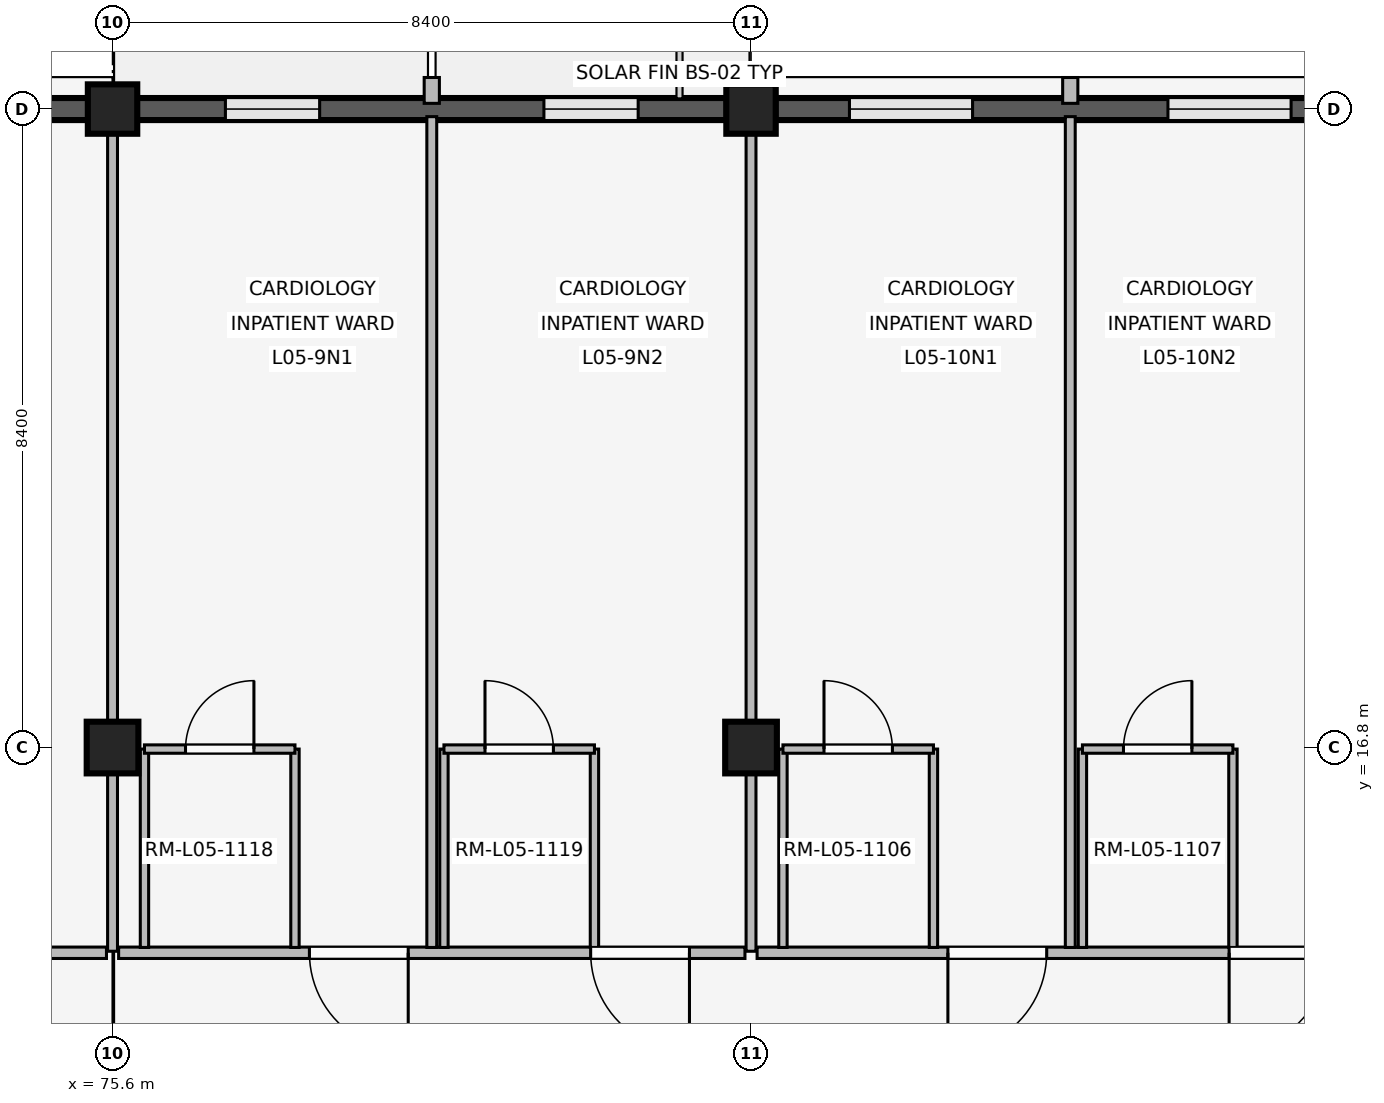
"""IFC4 building model, lengths in metres.
Left out: names, types, materials, properties, quantities, classifications, styles, units other than length and angle.
Written with IfcOpenShell. Run it as: python <this file> out.ifc"""

import sys

from ifc_helpers import new_model, si_unit, direction, frame, frame_2d, origin, origin_2d, place, context, subcontext, project, spatial, rectangle, extrude, element, fill, save


model = new_model("IFC4")
c1 = context("Model", 3, precision=1e-05, world=origin(), true_north=direction((0.0, 1.0)))
c2 = subcontext(c1, "Body", "Model", "MODEL_VIEW")
j1 = project(units=[si_unit("LENGTHUNIT", "METRE"), si_unit("PLANEANGLEUNIT", "RADIAN")], contexts=[c1])
p1 = place(None, origin())
s1 = spatial("IfcSite", under=j1, at=p1, CompositionType="ELEMENT")
p2 = place(p1, origin())
s2 = spatial("IfcBuilding", under=s1, at=p2, CompositionType="ELEMENT")
p3 = place(p2, frame((0.0, 0.0, 20.4)))
s3 = spatial("IfcBuildingStorey", under=s2, at=p3, CompositionType="ELEMENT", Elevation=20.4)
p4 = place(p3, frame((75.6, 16.8, 0.0), z_axis=(0.0, 0.0, 1.0), x_axis=(1.0, 0.0, 0.0)))
e1 = element("IfcColumn", 1, at=p4, inside=s3, PredefinedType="COLUMN", context=c2, shape_type="SweptSolid", body=[
    extrude(rectangle(XDim=0.68, YDim=0.68, at=origin_2d()), origin(), (0.0, 0.0, 1.0), 4.2),
])
p5 = place(p3, frame((75.6, 25.2, 0.0), z_axis=(0.0, 0.0, 1.0), x_axis=(1.0, 0.0, 0.0)))
e2 = element("IfcColumn", 2, at=p5, inside=s3, PredefinedType="COLUMN", context=c2, shape_type="SweptSolid", body=[
    extrude(rectangle(XDim=0.65, YDim=0.65, at=origin_2d()), origin(), (0.0, 0.0, 1.0), 4.2),
])
p6 = place(p3, frame((84.0, 16.8, 0.0), z_axis=(0.0, 0.0, 1.0), x_axis=(1.0, 0.0, 0.0)))
e3 = element("IfcColumn", 3, at=p6, inside=s3, PredefinedType="COLUMN", context=c2, shape_type="SweptSolid", body=[
    extrude(rectangle(XDim=0.68, YDim=0.68, at=origin_2d()), origin(), (0.0, 0.0, 1.0), 4.2),
])
p7 = place(p3, frame((84.0, 25.2, 0.0), z_axis=(0.0, 0.0, 1.0), x_axis=(1.0, 0.0, 0.0)))
e4 = element("IfcColumn", 4, at=p7, inside=s3, PredefinedType="COLUMN", context=c2, shape_type="SweptSolid", body=[
    extrude(rectangle(XDim=0.65, YDim=0.65, at=origin_2d()), origin(), (0.0, 0.0, 1.0), 4.2),
])
p8 = place(p3, frame((67.52, 25.2, 0.0), z_axis=(0.0, 0.0, 1.0), x_axis=(1.0, 0.0, 0.0)))
e5 = element("IfcWall", 5, at=p8, inside=s3, PredefinedType="SOLIDWALL", context=c2, shape_type="SweptSolid", body=[
    extrude(rectangle(XDim=7.76, YDim=0.29, at=frame_2d((3.88, 0.0))), origin(), (0.0, 0.0, 1.0), 3.34),
])
p9 = place(p8, frame((1.145, 0.0, 0.85)))
e6 = element("IfcOpeningElement", 6, at=p9, cuts=e5, PredefinedType="OPENING", context=c2, shape_type="SweptSolid", body=[
    extrude(rectangle(XDim=1.28, YDim=1.38, at=frame_2d((0.64, 0.69))), frame((0.0, 0.155, 0.0), z_axis=(0.0, -1.0, 0.0), x_axis=(1.0, 0.0, 0.0)), (0.0, 0.0, 1.0), 0.31),
])
p10 = place(p8, frame((5.335, 0.0, 0.85)))
e7 = element("IfcOpeningElement", 7, at=p10, cuts=e5, PredefinedType="OPENING", context=c2, shape_type="SweptSolid", body=[
    extrude(rectangle(XDim=1.28, YDim=1.38, at=frame_2d((0.64, 0.69))), frame((0.0, 0.155, 0.0), z_axis=(0.0, -1.0, 0.0), x_axis=(1.0, 0.0, 0.0)), (0.0, 0.0, 1.0), 0.31),
])
p11 = place(p3, frame((75.92, 25.2, 0.0), z_axis=(0.0, 0.0, 1.0), x_axis=(1.0, 0.0, 0.0)))
e8 = element("IfcWall", 8, at=p11, inside=s3, PredefinedType="SOLIDWALL", context=c2, shape_type="SweptSolid", body=[
    extrude(rectangle(XDim=7.76, YDim=0.29, at=frame_2d((3.88, 0.0))), origin(), (0.0, 0.0, 1.0), 3.34),
])
p12 = place(p11, frame((1.165, 0.0, 0.85)))
e9 = element("IfcOpeningElement", 9, at=p12, cuts=e8, PredefinedType="OPENING", context=c2, shape_type="SweptSolid", body=[
    extrude(rectangle(XDim=1.24, YDim=1.34, at=frame_2d((0.62, 0.67))), frame((0.0, 0.155, 0.0), z_axis=(0.0, -1.0, 0.0), x_axis=(1.0, 0.0, 0.0)), (0.0, 0.0, 1.0), 0.31),
])
p13 = place(p11, frame((5.355, 0.0, 0.85)))
e10 = element("IfcOpeningElement", 10, at=p13, cuts=e8, PredefinedType="OPENING", context=c2, shape_type="SweptSolid", body=[
    extrude(rectangle(XDim=1.24, YDim=1.34, at=frame_2d((0.62, 0.67))), frame((0.0, 0.155, 0.0), z_axis=(0.0, -1.0, 0.0), x_axis=(1.0, 0.0, 0.0)), (0.0, 0.0, 1.0), 0.31),
])
p14 = place(p3, frame((79.8, 25.275, 0.0), z_axis=(0.0, 0.0, 1.0), x_axis=(0.0, 1.0, 0.0)))
e11 = element("IfcWall", 11, at=p14, inside=s3, PredefinedType="ELEMENTEDWALL", context=c2, shape_type="SweptSolid", body=[
    extrude(rectangle(XDim=0.34, YDim=0.2, at=frame_2d((0.17, 0.0))), origin(), (0.0, 0.0, 1.0), 3.32),
])
p15 = place(p3, frame((84.32, 25.2, 0.0), z_axis=(0.0, 0.0, 1.0), x_axis=(1.0, 0.0, 0.0)))
e12 = element("IfcWall", 12, at=p15, inside=s3, PredefinedType="SOLIDWALL", context=c2, shape_type="SweptSolid", body=[
    extrude(rectangle(XDim=7.76, YDim=0.29, at=frame_2d((3.88, 0.0))), origin(), (0.0, 0.0, 1.0), 3.34),
])
p16 = place(p15, frame((0.975, 0.0, 0.85)))
e13 = element("IfcOpeningElement", 13, at=p16, cuts=e12, PredefinedType="OPENING", context=c2, shape_type="SweptSolid", body=[
    extrude(rectangle(XDim=1.62, YDim=1.52, at=frame_2d((0.81, 0.76))), frame((0.0, 0.155, 0.0), z_axis=(0.0, -1.0, 0.0), x_axis=(1.0, 0.0, 0.0)), (0.0, 0.0, 1.0), 0.31),
])
p17 = place(p15, frame((5.165, 0.0, 0.85)))
e14 = element("IfcOpeningElement", 14, at=p17, cuts=e12, PredefinedType="OPENING", context=c2, shape_type="SweptSolid", body=[
    extrude(rectangle(XDim=1.62, YDim=1.52, at=frame_2d((0.81, 0.76))), frame((0.0, 0.155, 0.0), z_axis=(0.0, -1.0, 0.0), x_axis=(1.0, 0.0, 0.0)), (0.0, 0.0, 1.0), 0.31),
])
p18 = place(p3, frame((88.2, 25.275, 0.0), z_axis=(0.0, 0.0, 1.0), x_axis=(0.0, 1.0, 0.0)))
e15 = element("IfcWall", 15, at=p18, inside=s3, PredefinedType="ELEMENTEDWALL", context=c2, shape_type="SweptSolid", body=[
    extrude(rectangle(XDim=0.34, YDim=0.2, at=frame_2d((0.17, 0.0))), origin(), (0.0, 0.0, 1.0), 3.32),
])
p19 = place(p3, frame((75.52, 14.1, 0.0), z_axis=(0.0, 0.0, 1.0), x_axis=(-1.0, 0.0, 0.0)))
e16 = element("IfcWall", 16, at=p19, inside=s3, PredefinedType="PARTITIONING", context=c2, shape_type="SweptSolid", body=[
    extrude(rectangle(XDim=8.24, YDim=0.15, at=frame_2d((4.12, 0.0))), origin(), (0.0, 0.0, 1.0), 3.32),
])
p20 = place(p19, frame((3.495, 0.0, 0.0)))
e17 = element("IfcOpeningElement", 17, at=p20, cuts=e16, PredefinedType="OPENING", context=c2, shape_type="SweptSolid", body=[
    extrude(rectangle(XDim=1.25, YDim=2.2, at=frame_2d((0.625, 1.1))), frame((0.0, 0.085, 0.0), z_axis=(0.0, -1.0, 0.0), x_axis=(1.0, 0.0, 0.0)), (0.0, 0.0, 1.0), 0.17),
])
p21 = place(p3, frame((75.6, 14.12, 0.0), z_axis=(0.0, 0.0, 1.0), x_axis=(0.0, 1.0, 0.0)))
e18 = element("IfcWall", 18, at=p21, inside=s3, PredefinedType="PARTITIONING", context=c2, shape_type="SweptSolid", body=[
    extrude(rectangle(XDim=10.94, YDim=0.13, at=frame_2d((5.47, 0.0))), origin(), (0.0, 0.0, 1.0), 3.32),
])
p22 = place(p3, frame((83.92, 14.1, 0.0), z_axis=(0.0, 0.0, 1.0), x_axis=(-1.0, 0.0, 0.0)))
e19 = element("IfcWall", 19, at=p22, inside=s3, PredefinedType="PARTITIONING", context=c2, shape_type="SweptSolid", body=[
    extrude(rectangle(XDim=8.24, YDim=0.15, at=frame_2d((4.12, 0.0))), origin(), (0.0, 0.0, 1.0), 3.32),
])
p23 = place(p22, frame((0.73, 0.0, 0.0)))
e20 = element("IfcOpeningElement", 20, at=p23, cuts=e19, PredefinedType="OPENING", context=c2, shape_type="SweptSolid", body=[
    extrude(rectangle(XDim=1.3, YDim=2.25, at=frame_2d((0.65, 1.125))), frame((0.0, 0.085, 0.0), z_axis=(0.0, -1.0, 0.0), x_axis=(1.0, 0.0, 0.0)), (0.0, 0.0, 1.0), 0.17),
])
p24 = place(p22, frame((4.43, 0.0, 0.0)))
e21 = element("IfcOpeningElement", 21, at=p24, cuts=e19, PredefinedType="OPENING", context=c2, shape_type="SweptSolid", body=[
    extrude(rectangle(XDim=1.3, YDim=2.25, at=frame_2d((0.65, 1.125))), frame((0.0, 0.085, 0.0), z_axis=(0.0, -1.0, 0.0), x_axis=(1.0, 0.0, 0.0)), (0.0, 0.0, 1.0), 0.17),
])
p25 = place(p3, frame((79.8, 14.17, 0.0), z_axis=(0.0, 0.0, 1.0), x_axis=(0.0, 1.0, 0.0)))
e22 = element("IfcWall", 22, at=p25, inside=s3, PredefinedType="PARTITIONING", context=c2, shape_type="SweptSolid", body=[
    extrude(rectangle(XDim=10.93, YDim=0.13, at=frame_2d((5.465, 0.0))), origin(), (0.0, 0.0, 1.0), 3.32),
])
for number, where, z_axis, x_axis in (
    (23, (76.02, 14.17, 0.0), (0.0, 0.0, 1.0), (0.0, 1.0, 0.0)),
    (24, (78.0, 14.17, 0.0), (0.0, 0.0, 1.0), (0.0, 1.0, 0.0)),
):
    element("IfcWall", number, at=place(p3, frame(where, z_axis=z_axis, x_axis=x_axis)), inside=s3, PredefinedType="PARTITIONING", context=c2, shape_type="SweptSolid", body=[
        extrude(rectangle(XDim=2.61, YDim=0.11, at=frame_2d((1.305, 0.0))), origin(), (0.0, 0.0, 1.0), 3.32),
    ])
p26 = place(p3, frame((76.02, 16.78, 0.0), z_axis=(0.0, 0.0, 1.0), x_axis=(1.0, 0.0, 0.0)))
e25 = element("IfcWall", 25, at=p26, inside=s3, PredefinedType="PARTITIONING", context=c2, shape_type="SweptSolid", body=[
    extrude(rectangle(XDim=1.98, YDim=0.11, at=frame_2d((0.99, 0.0))), origin(), (0.0, 0.0, 1.0), 3.32),
])
p27 = place(p26, frame((0.54, 0.0, 0.0)))
e26 = element("IfcOpeningElement", 26, at=p27, cuts=e25, PredefinedType="OPENING", context=c2, shape_type="SweptSolid", body=[
    extrude(rectangle(XDim=0.9, YDim=2.1, at=frame_2d((0.45, 1.05))), frame((0.0, 0.065, 0.0), z_axis=(0.0, -1.0, 0.0), x_axis=(1.0, 0.0, 0.0)), (0.0, 0.0, 1.0), 0.13),
])
for number, where, z_axis, x_axis in (
    (27, (79.96, 14.17, 0.0), (0.0, 0.0, 1.0), (0.0, 1.0, 0.0)),
    (28, (81.94, 14.17, 0.0), (0.0, 0.0, 1.0), (0.0, 1.0, 0.0)),
):
    element("IfcWall", number, at=place(p3, frame(where, z_axis=z_axis, x_axis=x_axis)), inside=s3, PredefinedType="PARTITIONING", context=c2, shape_type="SweptSolid", body=[
        extrude(rectangle(XDim=2.61, YDim=0.11, at=frame_2d((1.305, 0.0))), origin(), (0.0, 0.0, 1.0), 3.32),
    ])
p28 = place(p3, frame((79.96, 16.78, 0.0), z_axis=(0.0, 0.0, 1.0), x_axis=(1.0, 0.0, 0.0)))
e29 = element("IfcWall", 29, at=p28, inside=s3, PredefinedType="PARTITIONING", context=c2, shape_type="SweptSolid", body=[
    extrude(rectangle(XDim=1.98, YDim=0.11, at=frame_2d((0.99, 0.0))), origin(), (0.0, 0.0, 1.0), 3.32),
])
p29 = place(p28, frame((0.54, 0.0, 0.0)))
e30 = element("IfcOpeningElement", 30, at=p29, cuts=e29, PredefinedType="OPENING", context=c2, shape_type="SweptSolid", body=[
    extrude(rectangle(XDim=0.9, YDim=2.1, at=frame_2d((0.45, 1.05))), frame((0.0, 0.065, 0.0), z_axis=(0.0, -1.0, 0.0), x_axis=(1.0, 0.0, 0.0)), (0.0, 0.0, 1.0), 0.13),
])
p30 = place(p3, frame((84.0, 14.12, 0.0), z_axis=(0.0, 0.0, 1.0), x_axis=(0.0, 1.0, 0.0)))
e31 = element("IfcWall", 31, at=p30, inside=s3, PredefinedType="PARTITIONING", context=c2, shape_type="SweptSolid", body=[
    extrude(rectangle(XDim=10.94, YDim=0.13, at=frame_2d((5.47, 0.0))), origin(), (0.0, 0.0, 1.0), 3.32),
])
p31 = place(p3, frame((92.04, 14.1, 0.0), z_axis=(0.0, 0.0, 1.0), x_axis=(-1.0, 0.0, 0.0)))
e32 = element("IfcWall", 32, at=p31, inside=s3, PredefinedType="PARTITIONING", context=c2, shape_type="SweptSolid", body=[
    extrude(rectangle(XDim=7.96, YDim=0.15, at=frame_2d((3.98, 0.0))), origin(), (0.0, 0.0, 1.0), 3.32),
])
p32 = place(p31, frame((0.45, 0.0, 0.0)))
e33 = element("IfcOpeningElement", 33, at=p32, cuts=e32, PredefinedType="OPENING", context=c2, shape_type="SweptSolid", body=[
    extrude(rectangle(XDim=1.3, YDim=2.25, at=frame_2d((0.65, 1.125))), frame((0.0, 0.085, 0.0), z_axis=(0.0, -1.0, 0.0), x_axis=(1.0, 0.0, 0.0)), (0.0, 0.0, 1.0), 0.17),
])
p33 = place(p31, frame((4.15, 0.0, 0.0)))
e34 = element("IfcOpeningElement", 34, at=p33, cuts=e32, PredefinedType="OPENING", context=c2, shape_type="SweptSolid", body=[
    extrude(rectangle(XDim=1.3, YDim=2.25, at=frame_2d((0.65, 1.125))), frame((0.0, 0.085, 0.0), z_axis=(0.0, -1.0, 0.0), x_axis=(1.0, 0.0, 0.0)), (0.0, 0.0, 1.0), 0.17),
])
p34 = place(p3, frame((88.2, 14.17, 0.0), z_axis=(0.0, 0.0, 1.0), x_axis=(0.0, 1.0, 0.0)))
e35 = element("IfcWall", 35, at=p34, inside=s3, PredefinedType="PARTITIONING", context=c2, shape_type="SweptSolid", body=[
    extrude(rectangle(XDim=10.93, YDim=0.13, at=frame_2d((5.465, 0.0))), origin(), (0.0, 0.0, 1.0), 3.32),
])
for number, where, z_axis, x_axis in (
    (36, (84.42, 14.17, 0.0), (0.0, 0.0, 1.0), (0.0, 1.0, 0.0)),
    (37, (86.4, 14.17, 0.0), (0.0, 0.0, 1.0), (0.0, 1.0, 0.0)),
):
    element("IfcWall", number, at=place(p3, frame(where, z_axis=z_axis, x_axis=x_axis)), inside=s3, PredefinedType="PARTITIONING", context=c2, shape_type="SweptSolid", body=[
        extrude(rectangle(XDim=2.61, YDim=0.11, at=frame_2d((1.305, 0.0))), origin(), (0.0, 0.0, 1.0), 3.32),
    ])
p35 = place(p3, frame((84.42, 16.78, 0.0), z_axis=(0.0, 0.0, 1.0), x_axis=(1.0, 0.0, 0.0)))
e38 = element("IfcWall", 38, at=p35, inside=s3, PredefinedType="PARTITIONING", context=c2, shape_type="SweptSolid", body=[
    extrude(rectangle(XDim=1.98, YDim=0.11, at=frame_2d((0.99, 0.0))), origin(), (0.0, 0.0, 1.0), 3.32),
])
p36 = place(p35, frame((0.54, 0.0, 0.0)))
e39 = element("IfcOpeningElement", 39, at=p36, cuts=e38, PredefinedType="OPENING", context=c2, shape_type="SweptSolid", body=[
    extrude(rectangle(XDim=0.9, YDim=2.1, at=frame_2d((0.45, 1.05))), frame((0.0, 0.065, 0.0), z_axis=(0.0, -1.0, 0.0), x_axis=(1.0, 0.0, 0.0)), (0.0, 0.0, 1.0), 0.13),
])
for number, where, z_axis, x_axis in (
    (40, (88.36, 14.17, 0.0), (0.0, 0.0, 1.0), (0.0, 1.0, 0.0)),
    (41, (90.34, 14.17, 0.0), (0.0, 0.0, 1.0), (0.0, 1.0, 0.0)),
):
    element("IfcWall", number, at=place(p3, frame(where, z_axis=z_axis, x_axis=x_axis)), inside=s3, PredefinedType="PARTITIONING", context=c2, shape_type="SweptSolid", body=[
        extrude(rectangle(XDim=2.61, YDim=0.11, at=frame_2d((1.305, 0.0))), origin(), (0.0, 0.0, 1.0), 3.32),
    ])
p37 = place(p3, frame((88.36, 16.78, 0.0), z_axis=(0.0, 0.0, 1.0), x_axis=(1.0, 0.0, 0.0)))
e42 = element("IfcWall", 42, at=p37, inside=s3, PredefinedType="PARTITIONING", context=c2, shape_type="SweptSolid", body=[
    extrude(rectangle(XDim=1.98, YDim=0.11, at=frame_2d((0.99, 0.0))), origin(), (0.0, 0.0, 1.0), 3.32),
])
p38 = place(p37, frame((0.54, 0.0, 0.0)))
e43 = element("IfcOpeningElement", 43, at=p38, cuts=e42, PredefinedType="OPENING", context=c2, shape_type="SweptSolid", body=[
    extrude(rectangle(XDim=0.9, YDim=2.1, at=frame_2d((0.45, 1.05))), frame((0.0, 0.065, 0.0), z_axis=(0.0, -1.0, 0.0), x_axis=(1.0, 0.0, 0.0)), (0.0, 0.0, 1.0), 0.13),
])
p39 = place(p12, origin())
e44 = element("IfcWindow", 44, at=p39, inside=s3, PartitioningType="SINGLE_PANEL", PredefinedType="WINDOW", context=c2, shape_type="SweptSolid", body=[
    extrude(rectangle(XDim=1.24, YDim=1.34, at=frame_2d((0.62, 0.67))), frame((0.0, 0.03, 0.0), z_axis=(0.0, -1.0, 0.0), x_axis=(1.0, 0.0, 0.0)), (0.0, 0.0, 1.0), 0.06),
])
fill(e9, e44)
p40 = place(p13, origin())
e45 = element("IfcWindow", 45, at=p40, inside=s3, PartitioningType="SINGLE_PANEL", PredefinedType="WINDOW", context=c2, shape_type="SweptSolid", body=[
    extrude(rectangle(XDim=1.24, YDim=1.34, at=frame_2d((0.62, 0.67))), frame((0.0, 0.03, 0.0), z_axis=(0.0, -1.0, 0.0), x_axis=(1.0, 0.0, 0.0)), (0.0, 0.0, 1.0), 0.06),
])
fill(e10, e45)
p41 = place(p16, origin())
e46 = element("IfcWindow", 46, at=p41, inside=s3, PartitioningType="SINGLE_PANEL", PredefinedType="WINDOW", context=c2, shape_type="SweptSolid", body=[
    extrude(rectangle(XDim=1.62, YDim=1.52, at=frame_2d((0.81, 0.76))), frame((0.0, 0.03, 0.0), z_axis=(0.0, -1.0, 0.0), x_axis=(1.0, 0.0, 0.0)), (0.0, 0.0, 1.0), 0.06),
])
fill(e13, e46)
p42 = place(p17, origin())
e47 = element("IfcWindow", 47, at=p42, inside=s3, PartitioningType="SINGLE_PANEL", PredefinedType="WINDOW", context=c2, shape_type="SweptSolid", body=[
    extrude(rectangle(XDim=1.62, YDim=1.52, at=frame_2d((0.81, 0.76))), frame((0.0, 0.03, 0.0), z_axis=(0.0, -1.0, 0.0), x_axis=(1.0, 0.0, 0.0)), (0.0, 0.0, 1.0), 0.06),
])
fill(e14, e47)
p43 = place(p23, origin())
e48 = element("IfcDoor", 48, at=p43, inside=s3, OperationType="SINGLE_SWING_LEFT", PredefinedType="DOOR", context=c2, shape_type="SweptSolid", body=[
    extrude(rectangle(XDim=1.3, YDim=2.25, at=frame_2d((0.65, 1.125))), frame((0.0, 0.025, 0.0), z_axis=(0.0, -1.0, 0.0), x_axis=(1.0, 0.0, 0.0)), (0.0, 0.0, 1.0), 0.05),
])
fill(e20, e48)
p44 = place(p24, origin())
e49 = element("IfcDoor", 49, at=p44, inside=s3, OperationType="SINGLE_SWING_LEFT", PredefinedType="DOOR", context=c2, shape_type="SweptSolid", body=[
    extrude(rectangle(XDim=1.3, YDim=2.25, at=frame_2d((0.65, 1.125))), frame((0.0, 0.025, 0.0), z_axis=(0.0, -1.0, 0.0), x_axis=(1.0, 0.0, 0.0)), (0.0, 0.0, 1.0), 0.05),
])
fill(e21, e49)
p45 = place(p27, origin())
e50 = element("IfcDoor", 50, at=p45, inside=s3, OperationType="SINGLE_SWING_RIGHT", PredefinedType="DOOR", context=c2, shape_type="SweptSolid", body=[
    extrude(rectangle(XDim=0.9, YDim=2.1, at=frame_2d((0.45, 1.05))), frame((0.0, 0.025, 0.0), z_axis=(0.0, -1.0, 0.0), x_axis=(1.0, 0.0, 0.0)), (0.0, 0.0, 1.0), 0.05),
])
fill(e26, e50)
p46 = place(p29, origin())
e51 = element("IfcDoor", 51, at=p46, inside=s3, OperationType="SINGLE_SWING_LEFT", PredefinedType="DOOR", context=c2, shape_type="SweptSolid", body=[
    extrude(rectangle(XDim=0.9, YDim=2.1, at=frame_2d((0.45, 1.05))), frame((0.0, 0.025, 0.0), z_axis=(0.0, -1.0, 0.0), x_axis=(1.0, 0.0, 0.0)), (0.0, 0.0, 1.0), 0.05),
])
fill(e30, e51)
p47 = place(p32, origin())
e52 = element("IfcDoor", 52, at=p47, inside=s3, OperationType="SINGLE_SWING_RIGHT", PredefinedType="DOOR", context=c2, shape_type="SweptSolid", body=[
    extrude(rectangle(XDim=1.3, YDim=2.25, at=frame_2d((0.65, 1.125))), frame((0.0, 0.025, 0.0), z_axis=(0.0, -1.0, 0.0), x_axis=(1.0, 0.0, 0.0)), (0.0, 0.0, 1.0), 0.05),
])
fill(e33, e52)
p48 = place(p33, origin())
e53 = element("IfcDoor", 53, at=p48, inside=s3, OperationType="SINGLE_SWING_RIGHT", PredefinedType="DOOR", context=c2, shape_type="SweptSolid", body=[
    extrude(rectangle(XDim=1.3, YDim=2.25, at=frame_2d((0.65, 1.125))), frame((0.0, 0.025, 0.0), z_axis=(0.0, -1.0, 0.0), x_axis=(1.0, 0.0, 0.0)), (0.0, 0.0, 1.0), 0.05),
])
fill(e34, e53)
p49 = place(p36, origin())
e54 = element("IfcDoor", 54, at=p49, inside=s3, OperationType="SINGLE_SWING_LEFT", PredefinedType="DOOR", context=c2, shape_type="SweptSolid", body=[
    extrude(rectangle(XDim=0.9, YDim=2.1, at=frame_2d((0.45, 1.05))), frame((0.0, 0.025, 0.0), z_axis=(0.0, -1.0, 0.0), x_axis=(1.0, 0.0, 0.0)), (0.0, 0.0, 1.0), 0.05),
])
fill(e39, e54)
p50 = place(p38, origin())
e55 = element("IfcDoor", 55, at=p50, inside=s3, OperationType="SINGLE_SWING_RIGHT", PredefinedType="DOOR", context=c2, shape_type="SweptSolid", body=[
    extrude(rectangle(XDim=0.9, YDim=2.1, at=frame_2d((0.45, 1.05))), frame((0.0, 0.025, 0.0), z_axis=(0.0, -1.0, 0.0), x_axis=(1.0, 0.0, 0.0)), (0.0, 0.0, 1.0), 0.05),
])
fill(e43, e55)
save(model, sys.argv[1])
